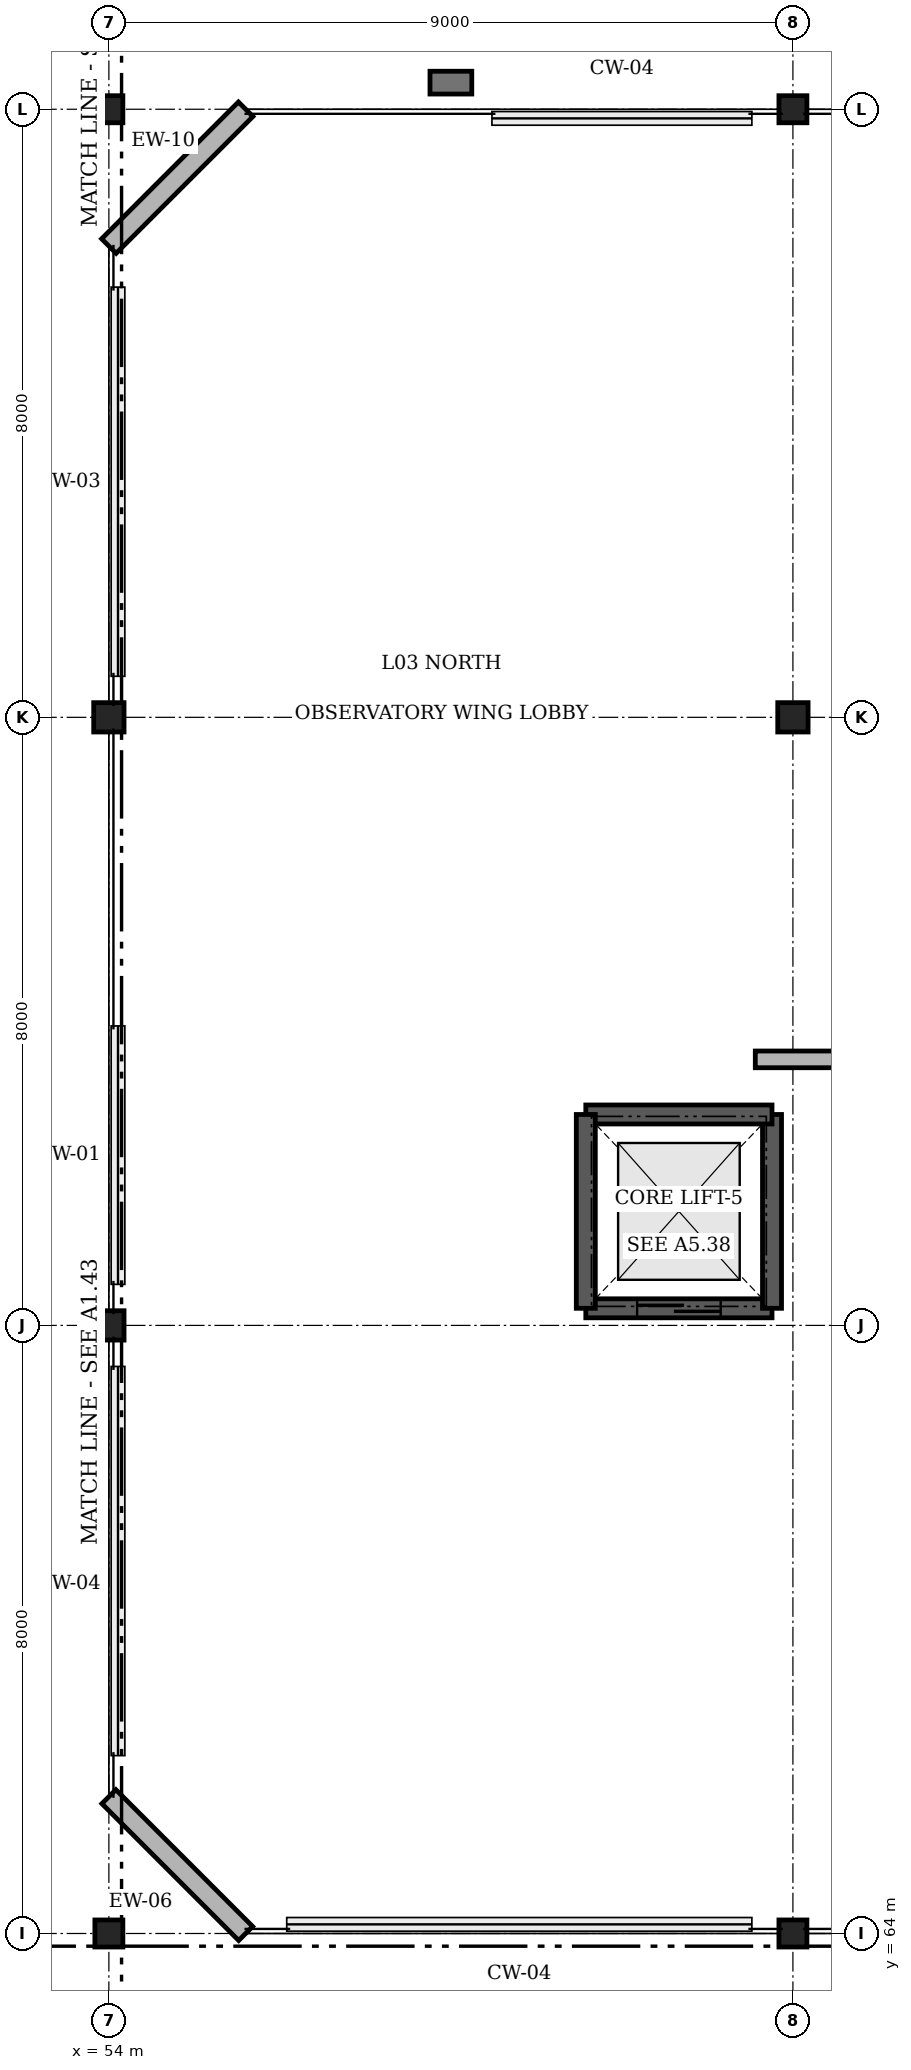
"""IFC4 building model, lengths in metres.
Left out: names, types, materials, properties, quantities, classifications, styles, units other than length and angle.
Written with IfcOpenShell. Run it as: python <this file> out.ifc"""

import sys

from ifc_helpers import new_model, si_unit, direction, frame, frame_2d, origin, origin_2d, place, context, subcontext, project, spatial, rectangle, i_section, extrude, element, fill, save


model = new_model("IFC4")
c1 = context("Model", 3, precision=1e-05, world=origin(), true_north=direction((0.0, 1.0)))
c2 = subcontext(c1, "Body", "Model", "MODEL_VIEW")
j1 = project(units=[si_unit("LENGTHUNIT", "METRE"), si_unit("PLANEANGLEUNIT", "RADIAN")], contexts=[c1])
p1 = place(None, origin())
s1 = spatial("IfcSite", under=j1, at=p1, CompositionType="ELEMENT")
p2 = place(p1, origin())
s2 = spatial("IfcBuilding", under=s1, at=p2, CompositionType="ELEMENT")
p3 = place(p2, frame((0.0, 0.0, 15.6)))
s3 = spatial("IfcBuildingStorey", under=s2, at=p3, CompositionType="ELEMENT", Elevation=15.6)
p4 = place(p3, frame((54.0, 64.0, 0.0), z_axis=(0.0, 0.0, 1.0), x_axis=(1.0, 0.0, 0.0)))
e1 = element("IfcColumn", 1, at=p4, inside=s3, PredefinedType="COLUMN", context=c2, shape_type="SweptSolid", body=[
    extrude(i_section(OverallWidth=0.368, OverallDepth=0.356, WebThickness=0.011, FlangeThickness=0.018, FilletRadius=0.015, at=origin_2d()), origin(), (0.0, 0.0, 1.0), 4.8),
])
for number, where, z_axis, x_axis in (
    (2, (54.0, 72.0, 0.0), (0.0, 0.0, 1.0), (1.0, 0.0, 0.0)),
    (3, (54.0, 80.0, 0.0), (0.0, 0.0, 1.0), (1.0, 0.0, 0.0)),
):
    element("IfcColumn", number, at=place(p3, frame(where, z_axis=z_axis, x_axis=x_axis)), inside=s3, PredefinedType="COLUMN", context=c2, shape_type="SweptSolid", body=[
        extrude(i_section(OverallWidth=0.399, OverallDepth=0.386, WebThickness=0.021, FlangeThickness=0.033, FilletRadius=0.015, at=origin_2d()), origin(), (0.0, 0.0, 1.0), 4.8),
    ])
for number, where, z_axis, x_axis in (
    (4, (54.0, 88.0, 0.0), (0.0, 0.0, 1.0), (1.0, 0.0, 0.0)),
    (5, (63.0, 64.0, 0.0), (0.0, 0.0, 1.0), (1.0, 0.0, 0.0)),
):
    element("IfcColumn", number, at=place(p3, frame(where, z_axis=z_axis, x_axis=x_axis)), inside=s3, PredefinedType="COLUMN", context=c2, shape_type="SweptSolid", body=[
        extrude(i_section(OverallWidth=0.368, OverallDepth=0.356, WebThickness=0.011, FlangeThickness=0.018, FilletRadius=0.015, at=origin_2d()), origin(), (0.0, 0.0, 1.0), 4.8),
    ])
p5 = place(p3, frame((63.0, 80.0, 0.0), z_axis=(0.0, 0.0, 1.0), x_axis=(1.0, 0.0, 0.0)))
e6 = element("IfcColumn", 6, at=p5, inside=s3, PredefinedType="COLUMN", context=c2, shape_type="SweptSolid", body=[
    extrude(i_section(OverallWidth=0.399, OverallDepth=0.386, WebThickness=0.021, FlangeThickness=0.033, FilletRadius=0.015, at=origin_2d()), origin(), (0.0, 0.0, 1.0), 4.8),
])
p6 = place(p3, frame((63.0, 88.0, 0.0), z_axis=(0.0, 0.0, 1.0), x_axis=(1.0, 0.0, 0.0)))
e7 = element("IfcColumn", 7, at=p6, inside=s3, PredefinedType="COLUMN", context=c2, shape_type="SweptSolid", body=[
    extrude(i_section(OverallWidth=0.368, OverallDepth=0.356, WebThickness=0.011, FlangeThickness=0.018, FilletRadius=0.015, at=origin_2d()), origin(), (0.0, 0.0, 1.0), 4.8),
])
p7 = place(p3, frame((58.5, 88.35, 0.0), z_axis=(0.0, 0.0, 1.0), x_axis=(1.0, 0.0, 0.0)))
e8 = element("IfcColumn", 8, at=p7, inside=s3, PredefinedType="PILASTER", context=c2, shape_type="SweptSolid", body=[
    extrude(rectangle(XDim=0.55, YDim=0.3, at=origin_2d()), origin(), (0.0, 0.0, 1.0), 4.8),
])
p8 = place(p3, frame((54.0, 86.2, 0.0), z_axis=(0.0, 0.0, 1.0), x_axis=(0.707106781187, 0.707106781187, 0.0)))
e9 = element("IfcWall", 9, at=p8, inside=s3, PredefinedType="SOLIDWALL", context=c2, shape_type="SweptSolid", body=[
    extrude(rectangle(XDim=2.546, YDim=0.27, at=frame_2d((1.273, 0.0))), origin(), (0.0, 0.0, 1.0), 3.656),
])
p9 = place(p3, frame((55.8, 64.0, 0.0), z_axis=(0.0, 0.0, 1.0), x_axis=(-0.707106781187, 0.707106781187, 0.0)))
e10 = element("IfcWall", 10, at=p9, inside=s3, PredefinedType="SOLIDWALL", context=c2, shape_type="SweptSolid", body=[
    extrude(rectangle(XDim=2.546, YDim=0.26, at=frame_2d((1.273, 0.0))), origin(), (0.0, 0.0, 1.0), 3.603),
])
p10 = place(p3, frame((60.275, 72.225, 0.0), z_axis=(0.0, 0.0, 1.0), x_axis=(1.0, 0.0, 0.0)))
e11 = element("IfcWall", 11, at=p10, inside=s3, PredefinedType="SOLIDWALL", context=c2, shape_type="SweptSolid", body=[
    extrude(rectangle(XDim=2.45, YDim=0.25, at=frame_2d((1.225, 0.0))), origin(), (0.0, 0.0, 1.0), 4.8),
])
p11 = place(p10, frame((0.675, 0.0, 0.0)))
e12 = element("IfcOpeningElement", 12, at=p11, cuts=e11, PredefinedType="OPENING", context=c2, shape_type="SweptSolid", body=[
    extrude(rectangle(XDim=1.1, YDim=2.2, at=frame_2d((0.55, 1.1))), frame((0.0, 0.135, 0.0), z_axis=(0.0, -1.0, 0.0), x_axis=(1.0, 0.0, 0.0)), (0.0, 0.0, 1.0), 0.27),
])
p12 = place(p3, frame((62.725, 72.225, 0.0), z_axis=(0.0, 0.0, 1.0), x_axis=(0.0, 1.0, 0.0)))
e13 = element("IfcWall", 13, at=p12, inside=s3, PredefinedType="SOLIDWALL", context=c2, shape_type="SweptSolid", body=[
    extrude(rectangle(XDim=2.55, YDim=0.25, at=frame_2d((1.275, 0.0))), origin(), (0.0, 0.0, 1.0), 4.8),
])
p13 = place(p3, frame((62.725, 74.775, 0.0), z_axis=(0.0, 0.0, 1.0), x_axis=(-1.0, 0.0, 0.0)))
e14 = element("IfcWall", 14, at=p13, inside=s3, PredefinedType="SOLIDWALL", context=c2, shape_type="SweptSolid", body=[
    extrude(rectangle(XDim=2.45, YDim=0.25, at=frame_2d((1.225, 0.0))), origin(), (0.0, 0.0, 1.0), 4.8),
])
p14 = place(p3, frame((60.275, 74.775, 0.0), z_axis=(0.0, 0.0, 1.0), x_axis=(0.0, -1.0, 0.0)))
e15 = element("IfcWall", 15, at=p14, inside=s3, PredefinedType="SOLIDWALL", context=c2, shape_type="SweptSolid", body=[
    extrude(rectangle(XDim=2.55, YDim=0.25, at=frame_2d((1.275, 0.0))), origin(), (0.0, 0.0, 1.0), 4.8),
])
p15 = place(p3, frame((62.505, 75.5, 0.0), z_axis=(0.0, 0.0, 1.0), x_axis=(1.0, 0.0, 0.0)))
e16 = element("IfcWall", 16, at=p15, inside=s3, PredefinedType="SOLIDWALL", context=c2, shape_type="SweptSolid", body=[
    extrude(rectangle(XDim=3.968, YDim=0.22, at=frame_2d((1.984, 0.0))), origin(), (0.0, 0.0, 1.0), 3.15),
])
p16 = place(p11, origin())
e17 = element("IfcDoor", 17, at=p16, inside=s3, OperationType="SLIDING_TO_LEFT", PredefinedType="DOOR", context=c2, shape_type="SweptSolid", body=[
    extrude(rectangle(XDim=1.1, YDim=2.2, at=frame_2d((0.55, 1.1))), frame((0.0, 0.025, 0.0), z_axis=(0.0, -1.0, 0.0), x_axis=(1.0, 0.0, 0.0)), (0.0, 0.0, 1.0), 0.05),
])
fill(e12, e17)
save(model, sys.argv[1])
